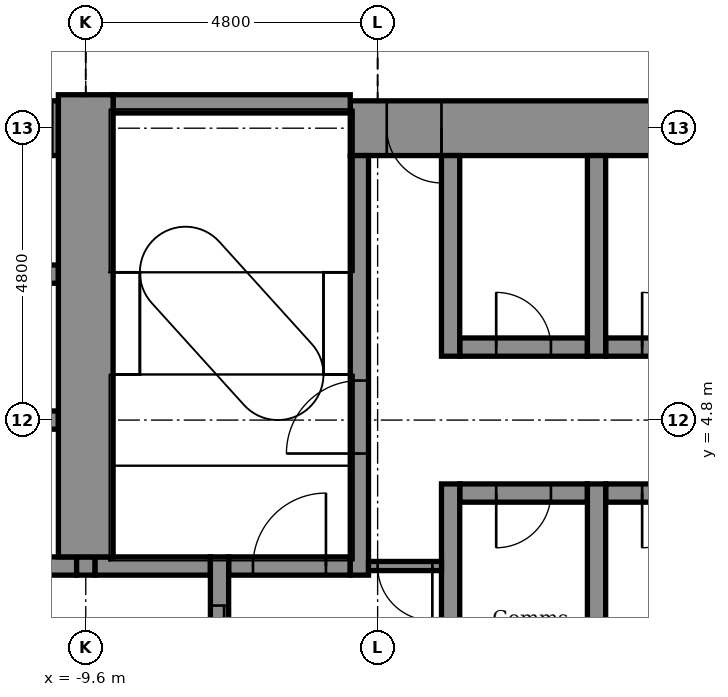
"""IFC4 building model, lengths in metres.
Left out: names, types, materials, properties, quantities, classifications, styles, units other than length and angle.
Written with IfcOpenShell. Run it as: python <this file> out.ifc"""

import sys

from ifc_helpers import new_model, si_unit, direction, frame, frame_2d, origin, place, context, subcontext, project, spatial, rectangle, extrude, element, fill, save


model = new_model("IFC4")
c1 = context("Model", 3, precision=1e-05, world=origin(), true_north=direction((0.0, 1.0)))
c2 = subcontext(c1, "Body", "Model", "MODEL_VIEW")
j1 = project(units=[si_unit("LENGTHUNIT", "METRE"), si_unit("PLANEANGLEUNIT", "RADIAN")], contexts=[c1])
p1 = place(None, origin())
s1 = spatial("IfcSite", under=j1, at=p1, CompositionType="ELEMENT")
p2 = place(p1, origin())
s2 = spatial("IfcBuilding", under=s1, at=p2, CompositionType="ELEMENT")
p3 = place(p2, frame((0.0, 0.0, 95.9)))
s3 = spatial("IfcBuildingStorey", under=s2, at=p3, CompositionType="ELEMENT", Elevation=95.9)
p4 = place(p3, frame((-10.85, 2.4, -0.2), z_axis=(0.0, 0.0, 1.0), x_axis=(1.0, 0.0, 0.0)))
e1 = element("IfcWall", 1, at=p4, inside=s3, PredefinedType="STANDARD", context=c2, shape_type="SweptSolid", body=[
    extrude(rectangle(XDim=1.1, YDim=0.3, at=frame_2d((0.55, 0.0))), origin(), (0.0, 0.0, 1.0), 4.5),
])
p5 = place(p3, frame((-9.45, 2.4, -0.2), z_axis=(0.0, 0.0, 1.0), x_axis=(1.0, 0.0, 0.0)))
e2 = element("IfcWall", 2, at=p5, inside=s3, PredefinedType="STANDARD", context=c2, shape_type="SweptSolid", body=[
    extrude(rectangle(XDim=1.9, YDim=0.3, at=frame_2d((0.95, 0.0))), origin(), (0.0, 0.0, 1.0), 4.5),
])
p6 = place(p3, frame((-7.25, 2.4, -0.2), z_axis=(0.0, 0.0, 1.0), x_axis=(1.0, 0.0, 0.0)))
e3 = element("IfcWall", 3, at=p6, inside=s3, PredefinedType="STANDARD", context=c2, shape_type="SweptSolid", body=[
    extrude(rectangle(XDim=2.0, YDim=0.3, at=frame_2d((1.0, 0.0))), origin(), (0.0, 0.0, 1.0), 4.5),
])
p7 = place(p6, frame((0.4, 0.0, 0.2)))
e4 = element("IfcOpeningElement", 4, at=p7, cuts=e3, PredefinedType="OPENING", context=c2, shape_type="SweptSolid", body=[
    extrude(rectangle(XDim=1.2, YDim=2.1, at=frame_2d((0.6, 1.05))), frame((0.0, 0.16, 0.0), z_axis=(0.0, -1.0, 0.0), x_axis=(1.0, 0.0, 0.0)), (0.0, 0.0, 1.0), 0.32),
])
p8 = place(p3, frame((-3.45, 3.6, -0.2), z_axis=(0.0, 0.0, 1.0), x_axis=(1.0, 0.0, 0.0)))
e5 = element("IfcWall", 5, at=p8, inside=s3, PredefinedType="STANDARD", context=c2, shape_type="SweptSolid", body=[
    extrude(rectangle(XDim=2.1, YDim=0.3, at=frame_2d((1.05, 0.0))), origin(), (0.0, 0.0, 1.0), 4.5),
])
p9 = place(p8, frame((0.6, 0.0, 0.2)))
e6 = element("IfcOpeningElement", 6, at=p9, cuts=e5, PredefinedType="OPENING", context=c2, shape_type="SweptSolid", body=[
    extrude(rectangle(XDim=0.9, YDim=2.1, at=frame_2d((0.45, 1.05))), frame((0.0, 0.16, 0.0), z_axis=(0.0, -1.0, 0.0), x_axis=(1.0, 0.0, 0.0)), (0.0, 0.0, 1.0), 0.32),
])
p10 = place(p3, frame((-1.05, 3.6, -0.2), z_axis=(0.0, 0.0, 1.0), x_axis=(1.0, 0.0, 0.0)))
e7 = element("IfcWall", 7, at=p10, inside=s3, PredefinedType="STANDARD", context=c2, shape_type="SweptSolid", body=[
    extrude(rectangle(XDim=2.1, YDim=0.3, at=frame_2d((1.05, 0.0))), origin(), (0.0, 0.0, 1.0), 4.5),
])
p11 = place(p10, frame((0.6, 0.0, 0.2)))
e8 = element("IfcOpeningElement", 8, at=p11, cuts=e7, PredefinedType="OPENING", context=c2, shape_type="SweptSolid", body=[
    extrude(rectangle(XDim=0.9, YDim=2.1, at=frame_2d((0.45, 1.05))), frame((0.0, 0.16, 0.0), z_axis=(0.0, -1.0, 0.0), x_axis=(1.0, 0.0, 0.0)), (0.0, 0.0, 1.0), 0.32),
])
p12 = place(p3, frame((-13.95, 4.8, -0.2), z_axis=(0.0, 0.0, 1.0), x_axis=(1.0, 0.0, 0.0)))
e9 = element("IfcWall", 9, at=p12, inside=s3, PredefinedType="STANDARD", context=c2, shape_type="SweptSolid", body=[
    extrude(rectangle(XDim=3.9, YDim=0.3, at=frame_2d((1.95, 0.0))), origin(), (0.0, 0.0, 1.0), 4.5),
])
p13 = place(p3, frame((-3.45, 6.0, -0.2), z_axis=(0.0, 0.0, 1.0), x_axis=(1.0, 0.0, 0.0)))
e10 = element("IfcWall", 10, at=p13, inside=s3, PredefinedType="STANDARD", context=c2, shape_type="SweptSolid", body=[
    extrude(rectangle(XDim=2.1, YDim=0.3, at=frame_2d((1.05, 0.0))), origin(), (0.0, 0.0, 1.0), 4.5),
])
p14 = place(p13, frame((0.6, 0.0, 0.2)))
e11 = element("IfcOpeningElement", 11, at=p14, cuts=e10, PredefinedType="OPENING", context=c2, shape_type="SweptSolid", body=[
    extrude(rectangle(XDim=0.9, YDim=2.1, at=frame_2d((0.45, 1.05))), frame((0.0, 0.16, 0.0), z_axis=(0.0, -1.0, 0.0), x_axis=(1.0, 0.0, 0.0)), (0.0, 0.0, 1.0), 0.32),
])
p15 = place(p3, frame((-1.05, 6.0, -0.2), z_axis=(0.0, 0.0, 1.0), x_axis=(1.0, 0.0, 0.0)))
e12 = element("IfcWall", 12, at=p15, inside=s3, PredefinedType="STANDARD", context=c2, shape_type="SweptSolid", body=[
    extrude(rectangle(XDim=2.1, YDim=0.3, at=frame_2d((1.05, 0.0))), origin(), (0.0, 0.0, 1.0), 4.5),
])
p16 = place(p15, frame((0.6, 0.0, 0.2)))
e13 = element("IfcOpeningElement", 13, at=p16, cuts=e12, PredefinedType="OPENING", context=c2, shape_type="SweptSolid", body=[
    extrude(rectangle(XDim=0.9, YDim=2.1, at=frame_2d((0.45, 1.05))), frame((0.0, 0.16, 0.0), z_axis=(0.0, -1.0, 0.0), x_axis=(1.0, 0.0, 0.0)), (0.0, 0.0, 1.0), 0.32),
])
p17 = place(p3, frame((-13.95, 7.2, -0.2), z_axis=(0.0, 0.0, 1.0), x_axis=(1.0, 0.0, 0.0)))
e14 = element("IfcWall", 14, at=p17, inside=s3, PredefinedType="STANDARD", context=c2, shape_type="SweptSolid", body=[
    extrude(rectangle(XDim=3.9, YDim=0.3, at=frame_2d((1.95, 0.0))), origin(), (0.0, 0.0, 1.0), 4.5),
])
p18 = place(p3, frame((-13.95, 9.6, -0.2), z_axis=(0.0, 0.0, 1.0), x_axis=(1.0, 0.0, 0.0)))
e15 = element("IfcWall", 15, at=p18, inside=s3, PredefinedType="SHEAR", context=c2, shape_type="SweptSolid", body=[
    extrude(rectangle(XDim=3.9, YDim=0.9, at=frame_2d((1.95, 0.0))), origin(), (0.0, 0.0, 1.0), 4.5),
])
p19 = place(p18, frame((0.5, 0.0, 0.2)))
e16 = element("IfcOpeningElement", 16, at=p19, cuts=e15, PredefinedType="OPENING", context=c2, shape_type="SweptSolid", body=[
    extrude(rectangle(XDim=0.9, YDim=2.1, at=frame_2d((0.45, 1.05))), frame((0.0, 0.46, 0.0), z_axis=(0.0, -1.0, 0.0), x_axis=(1.0, 0.0, 0.0)), (0.0, 0.0, 1.0), 0.92),
])
p20 = place(p18, frame((2.9, 0.0, 0.2)))
e17 = element("IfcOpeningElement", 17, at=p20, cuts=e15, PredefinedType="OPENING", context=c2, shape_type="SweptSolid", body=[
    extrude(rectangle(XDim=0.9, YDim=2.1, at=frame_2d((0.45, 1.05))), frame((0.0, 0.46, 0.0), z_axis=(0.0, -1.0, 0.0), x_axis=(1.0, 0.0, 0.0)), (0.0, 0.0, 1.0), 0.92),
])
p21 = place(p3, frame((-5.25, 9.6, -0.2), z_axis=(0.0, 0.0, 1.0), x_axis=(1.0, 0.0, 0.0)))
e18 = element("IfcWall", 18, at=p21, inside=s3, PredefinedType="SHEAR", context=c2, shape_type="SweptSolid", body=[
    extrude(rectangle(XDim=14.4, YDim=0.9, at=frame_2d((7.2, 0.0))), origin(), (0.0, 0.0, 1.0), 4.5),
])
p22 = place(p21, frame((0.6, 0.0, 0.2)))
e19 = element("IfcOpeningElement", 19, at=p22, cuts=e18, PredefinedType="OPENING", context=c2, shape_type="SweptSolid", body=[
    extrude(rectangle(XDim=0.9, YDim=2.1, at=frame_2d((0.45, 1.05))), frame((0.0, 0.46, 0.0), z_axis=(0.0, -1.0, 0.0), x_axis=(1.0, 0.0, 0.0)), (0.0, 0.0, 1.0), 0.92),
])
p23 = place(p3, frame((-9.15, 10.0, -0.2), z_axis=(0.0, 0.0, 1.0), x_axis=(1.0, 0.0, 0.0)))
e20 = element("IfcWall", 20, at=p23, inside=s3, PredefinedType="STANDARD", context=c2, shape_type="SweptSolid", body=[
    extrude(rectangle(XDim=3.9, YDim=0.3, at=frame_2d((1.95, 0.0))), origin(), (0.0, 0.0, 1.0), 4.5),
])
p24 = place(p3, frame((-9.6, 2.25, -0.2), z_axis=(0.0, 0.0, 1.0), x_axis=(0.0, 1.0, 0.0)))
e21 = element("IfcWall", 21, at=p24, inside=s3, PredefinedType="STANDARD", context=c2, shape_type="SweptSolid", body=[
    extrude(rectangle(XDim=0.3, YDim=0.3, at=frame_2d((0.15, 0.0))), origin(), (0.0, 0.0, 1.0), 4.5),
])
p25 = place(p3, frame((-9.6, 2.55, -0.2), z_axis=(0.0, 0.0, 1.0), x_axis=(0.0, 1.0, 0.0)))
e22 = element("IfcWall", 22, at=p25, inside=s3, PredefinedType="SHEAR", context=c2, shape_type="SweptSolid", body=[
    extrude(rectangle(XDim=7.6, YDim=0.9, at=frame_2d((3.8, 0.0))), origin(), (0.0, 0.0, 1.0), 4.5),
])
p26 = place(p3, frame((-7.4, -2.55, -0.2), z_axis=(0.0, 0.0, 1.0), x_axis=(0.0, 1.0, 0.0)))
e23 = element("IfcWall", 23, at=p26, inside=s3, PredefinedType="STANDARD", context=c2, shape_type="SweptSolid", body=[
    extrude(rectangle(XDim=5.1, YDim=0.3, at=frame_2d((2.55, 0.0))), origin(), (0.0, 0.0, 1.0), 4.5),
])
p27 = place(p26, frame((0.8, 0.0, 0.2)))
e24 = element("IfcOpeningElement", 24, at=p27, cuts=e23, PredefinedType="OPENING", context=c2, shape_type="SweptSolid", body=[
    extrude(rectangle(XDim=1.1, YDim=2.1, at=frame_2d((0.55, 1.05))), frame((0.0, 0.16, 0.0), z_axis=(0.0, -1.0, 0.0), x_axis=(1.0, 0.0, 0.0)), (0.0, 0.0, 1.0), 0.32),
])
p28 = place(p26, frame((3.2, 0.0, 0.2)))
e25 = element("IfcOpeningElement", 25, at=p28, cuts=e23, PredefinedType="OPENING", context=c2, shape_type="SweptSolid", body=[
    extrude(rectangle(XDim=1.1, YDim=2.1, at=frame_2d((0.55, 1.05))), frame((0.0, 0.16, 0.0), z_axis=(0.0, -1.0, 0.0), x_axis=(1.0, 0.0, 0.0)), (0.0, 0.0, 1.0), 0.32),
])
p29 = place(p3, frame((-5.1, 2.25, -0.2), z_axis=(0.0, 0.0, 1.0), x_axis=(0.0, 1.0, 0.0)))
e26 = element("IfcWall", 26, at=p29, inside=s3, PredefinedType="STANDARD", context=c2, shape_type="SweptSolid", body=[
    extrude(rectangle(XDim=6.9, YDim=0.3, at=frame_2d((3.45, 0.0))), origin(), (0.0, 0.0, 1.0), 4.5),
])
p30 = place(p29, frame((2.0, 0.0, 0.2)))
e27 = element("IfcOpeningElement", 27, at=p30, cuts=e26, PredefinedType="OPENING", context=c2, shape_type="SweptSolid", body=[
    extrude(rectangle(XDim=1.2, YDim=2.1, at=frame_2d((0.6, 1.05))), frame((0.0, 0.16, 0.0), z_axis=(0.0, -1.0, 0.0), x_axis=(1.0, 0.0, 0.0)), (0.0, 0.0, 1.0), 0.32),
])
p31 = place(p3, frame((-3.6, -3.75, -0.2), z_axis=(0.0, 0.0, 1.0), x_axis=(0.0, 1.0, 0.0)))
e28 = element("IfcWall", 28, at=p31, inside=s3, PredefinedType="STANDARD", context=c2, shape_type="SweptSolid", body=[
    extrude(rectangle(XDim=7.5, YDim=0.3, at=frame_2d((3.75, 0.0))), origin(), (0.0, 0.0, 1.0), 4.5),
])
p32 = place(p3, frame((-3.6, 5.85, -0.2), z_axis=(0.0, 0.0, 1.0), x_axis=(0.0, 1.0, 0.0)))
e29 = element("IfcWall", 29, at=p32, inside=s3, PredefinedType="STANDARD", context=c2, shape_type="SweptSolid", body=[
    extrude(rectangle(XDim=3.3, YDim=0.3, at=frame_2d((1.65, 0.0))), origin(), (0.0, 0.0, 1.0), 4.5),
])
p33 = place(p3, frame((-1.2, -3.75, -0.2), z_axis=(0.0, 0.0, 1.0), x_axis=(0.0, 1.0, 0.0)))
e30 = element("IfcWall", 30, at=p33, inside=s3, PredefinedType="STANDARD", context=c2, shape_type="SweptSolid", body=[
    extrude(rectangle(XDim=7.5, YDim=0.3, at=frame_2d((3.75, 0.0))), origin(), (0.0, 0.0, 1.0), 4.5),
])
p34 = place(p3, frame((-1.2, 5.85, -0.2), z_axis=(0.0, 0.0, 1.0), x_axis=(0.0, 1.0, 0.0)))
e31 = element("IfcWall", 31, at=p34, inside=s3, PredefinedType="STANDARD", context=c2, shape_type="SweptSolid", body=[
    extrude(rectangle(XDim=3.3, YDim=0.3, at=frame_2d((1.65, 0.0))), origin(), (0.0, 0.0, 1.0), 4.5),
])
p35 = place(p3, frame((-4.95, 2.4, 0.0), z_axis=(0.0, 0.0, 1.0), x_axis=(1.0, 0.0, 0.0)))
e32 = element("IfcWall", 32, at=p35, inside=s3, PredefinedType="PARTITIONING", context=c2, shape_type="SweptSolid", body=[
    extrude(rectangle(XDim=1.2, YDim=0.15, at=frame_2d((0.6, 0.0))), origin(), (0.0, 0.0, 1.0), 4.3),
])
p36 = place(p35, frame((0.15, 0.0, 0.0)))
e33 = element("IfcOpeningElement", 33, at=p36, cuts=e32, PredefinedType="OPENING", context=c2, shape_type="SweptSolid", body=[
    extrude(rectangle(XDim=0.9, YDim=2.1, at=frame_2d((0.45, 1.05))), frame((0.0, 0.085, 0.0), z_axis=(0.0, -1.0, 0.0), x_axis=(1.0, 0.0, 0.0)), (0.0, 0.0, 1.0), 0.17),
])
p37 = place(p28, origin())
e34 = element("IfcDoor", 34, at=p37, inside=s3, OperationType="DOUBLE_DOOR_SLIDING", PredefinedType="DOOR", context=c2, shape_type="SweptSolid", body=[
    extrude(rectangle(XDim=1.1, YDim=2.1, at=frame_2d((0.55, 1.05))), frame((0.0, 0.025, 0.0), z_axis=(0.0, -1.0, 0.0), x_axis=(1.0, 0.0, 0.0)), (0.0, 0.0, 1.0), 0.05),
])
fill(e25, e34)
p38 = place(p30, origin())
e35 = element("IfcDoor", 35, at=p38, inside=s3, OperationType="SINGLE_SWING_LEFT", PredefinedType="DOOR", context=c2, shape_type="SweptSolid", body=[
    extrude(rectangle(XDim=1.2, YDim=2.1, at=frame_2d((0.6, 1.05))), frame((0.0, 0.025, 0.0), z_axis=(0.0, -1.0, 0.0), x_axis=(1.0, 0.0, 0.0)), (0.0, 0.0, 1.0), 0.05),
])
fill(e27, e35)
p39 = place(p14, origin())
e36 = element("IfcDoor", 36, at=p39, inside=s3, OperationType="SINGLE_SWING_LEFT", PredefinedType="DOOR", context=c2, shape_type="SweptSolid", body=[
    extrude(rectangle(XDim=0.9, YDim=2.1, at=frame_2d((0.45, 1.05))), frame((0.0, 0.025, 0.0), z_axis=(0.0, -1.0, 0.0), x_axis=(1.0, 0.0, 0.0)), (0.0, 0.0, 1.0), 0.05),
])
fill(e11, e36)
p40 = place(p16, origin())
e37 = element("IfcDoor", 37, at=p40, inside=s3, OperationType="SINGLE_SWING_LEFT", PredefinedType="DOOR", context=c2, shape_type="SweptSolid", body=[
    extrude(rectangle(XDim=0.9, YDim=2.1, at=frame_2d((0.45, 1.05))), frame((0.0, 0.025, 0.0), z_axis=(0.0, -1.0, 0.0), x_axis=(1.0, 0.0, 0.0)), (0.0, 0.0, 1.0), 0.05),
])
fill(e13, e37)
p41 = place(p9, frame((0.9, 0.0, 0.0), z_axis=(0.0, 0.0, 1.0), x_axis=(-1.0, 0.0, 0.0)))
e38 = element("IfcDoor", 38, at=p41, inside=s3, OperationType="SINGLE_SWING_LEFT", PredefinedType="DOOR", context=c2, shape_type="SweptSolid", body=[
    extrude(rectangle(XDim=0.9, YDim=2.1, at=frame_2d((0.45, 1.05))), frame((0.0, 0.025, 0.0), z_axis=(0.0, -1.0, 0.0), x_axis=(1.0, 0.0, 0.0)), (0.0, 0.0, 1.0), 0.05),
])
fill(e6, e38)
p42 = place(p11, frame((0.9, 0.0, 0.0), z_axis=(0.0, 0.0, 1.0), x_axis=(-1.0, 0.0, 0.0)))
e39 = element("IfcDoor", 39, at=p42, inside=s3, OperationType="SINGLE_SWING_LEFT", PredefinedType="DOOR", context=c2, shape_type="SweptSolid", body=[
    extrude(rectangle(XDim=0.9, YDim=2.1, at=frame_2d((0.45, 1.05))), frame((0.0, 0.025, 0.0), z_axis=(0.0, -1.0, 0.0), x_axis=(1.0, 0.0, 0.0)), (0.0, 0.0, 1.0), 0.05),
])
fill(e8, e39)
p43 = place(p22, frame((0.9, 0.0, 0.0), z_axis=(0.0, 0.0, 1.0), x_axis=(-1.0, 0.0, 0.0)))
e40 = element("IfcDoor", 40, at=p43, inside=s3, OperationType="SINGLE_SWING_RIGHT", PredefinedType="DOOR", context=c2, shape_type="SweptSolid", body=[
    extrude(rectangle(XDim=0.9, YDim=2.1, at=frame_2d((0.45, 1.05))), frame((0.0, 0.025, 0.0), z_axis=(0.0, -1.0, 0.0), x_axis=(1.0, 0.0, 0.0)), (0.0, 0.0, 1.0), 0.05),
])
fill(e19, e40)
p44 = place(p36, frame((0.9, 0.0, 0.0), z_axis=(0.0, 0.0, 1.0), x_axis=(-1.0, 0.0, 0.0)))
e41 = element("IfcDoor", 41, at=p44, inside=s3, OperationType="SINGLE_SWING_RIGHT", PredefinedType="DOOR", context=c2, shape_type="SweptSolid", body=[
    extrude(rectangle(XDim=0.9, YDim=2.1, at=frame_2d((0.45, 1.05))), frame((0.0, 0.025, 0.0), z_axis=(0.0, -1.0, 0.0), x_axis=(1.0, 0.0, 0.0)), (0.0, 0.0, 1.0), 0.05),
])
fill(e33, e41)
p45 = place(p7, origin())
e42 = element("IfcDoor", 42, at=p45, inside=s3, OperationType="SINGLE_SWING_RIGHT", PredefinedType="DOOR", context=c2, shape_type="SweptSolid", body=[
    extrude(rectangle(XDim=1.2, YDim=2.1, at=frame_2d((0.6, 1.05))), frame((0.0, 0.025, 0.0), z_axis=(0.0, -1.0, 0.0), x_axis=(1.0, 0.0, 0.0)), (0.0, 0.0, 1.0), 0.05),
])
fill(e4, e42)
save(model, sys.argv[1])
